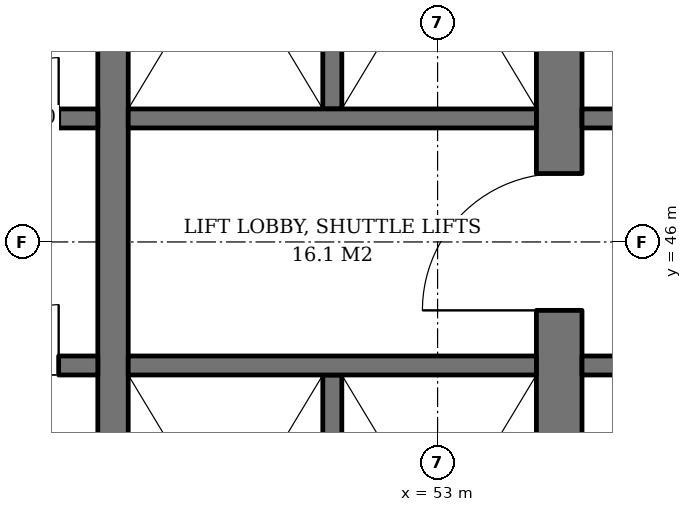
"""IFC4 building model, lengths in metres.
Left out: names, types, materials, properties, quantities, classifications, styles, units other than length and angle.
Written with IfcOpenShell. Run it as: python <this file> out.ifc"""

import sys

from ifc_helpers import new_model, si_unit, direction, frame, frame_2d, origin, place, context, subcontext, project, spatial, rectangle, extrude, element, fill, save


model = new_model("IFC4")
c1 = context("Model", 3, precision=1e-05, world=origin(), true_north=direction((0.0, 1.0)))
c2 = subcontext(c1, "Body", "Model", "MODEL_VIEW")
j1 = project(units=[si_unit("LENGTHUNIT", "METRE"), si_unit("PLANEANGLEUNIT", "RADIAN")], contexts=[c1])
p1 = place(None, origin())
s1 = spatial("IfcSite", under=j1, at=p1, CompositionType="ELEMENT")
p2 = place(p1, origin())
s2 = spatial("IfcBuilding", under=s1, at=p2, CompositionType="ELEMENT")
p3 = place(p2, frame((0.0, 0.0, 131.2)))
s3 = spatial("IfcBuildingStorey", under=s2, at=p3, CompositionType="ELEMENT", Elevation=131.2)
p4 = place(p3, frame((54.6, 36.7, 0.0), z_axis=(0.0, 0.0, 1.0), x_axis=(0.0, 1.0, 0.0)))
e1 = element("IfcWall", 1, at=p4, inside=s3, PredefinedType="SHEAR", context=c2, shape_type="SweptSolid", body=[
    extrude(rectangle(XDim=18.6, YDim=0.6, at=frame_2d((9.3, 0.0))), origin(), (0.0, 0.0, 1.0), 3.8),
])
p5 = place(p4, frame((8.4, 0.0, 0.0)))
e2 = element("IfcOpeningElement", 2, at=p5, cuts=e1, PredefinedType="OPENING", context=c2, shape_type="SweptSolid", body=[
    extrude(rectangle(XDim=1.8, YDim=2.4, at=frame_2d((0.9, 1.2))), frame((0.0, 0.31, 0.0), z_axis=(0.0, -1.0, 0.0), x_axis=(1.0, 0.0, 0.0)), (0.0, 0.0, 1.0), 0.62),
])
p6 = place(p3, frame((48.73, 40.0, 0.0), z_axis=(0.0, 0.0, 1.0), x_axis=(0.0, 1.0, 0.0)))
e3 = element("IfcWall", 3, at=p6, inside=s3, PredefinedType="SHEAR", context=c2, shape_type="SweptSolid", body=[
    extrude(rectangle(XDim=12.0, YDim=0.4, at=frame_2d((6.0, 0.0))), origin(), (0.0, 0.0, 1.0), 3.8),
])
p7 = place(p3, frame((35.7, 47.625, 0.0), z_axis=(0.0, 0.0, 1.0), x_axis=(1.0, 0.0, 0.0)))
e4 = element("IfcWall", 4, at=p7, inside=s3, PredefinedType="SHEAR", context=c2, shape_type="SweptSolid", body=[
    extrude(rectangle(XDim=12.83, YDim=0.25, at=frame_2d((6.415, 0.0))), origin(), (0.0, 0.0, 1.0), 3.8),
])
p8 = place(p7, frame((0.7, 0.0, 0.0)))
e5 = element("IfcOpeningElement", 5, at=p8, cuts=e4, PredefinedType="OPENING", context=c2, shape_type="SweptSolid", body=[
    extrude(rectangle(XDim=1.1, YDim=2.2, at=frame_2d((0.55, 1.1))), frame((0.0, 0.135, 0.0), z_axis=(0.0, -1.0, 0.0), x_axis=(1.0, 0.0, 0.0)), (0.0, 0.0, 1.0), 0.27),
])
p9 = place(p7, frame((3.45, 0.0, 0.0)))
e6 = element("IfcOpeningElement", 6, at=p9, cuts=e4, PredefinedType="OPENING", context=c2, shape_type="SweptSolid", body=[
    extrude(rectangle(XDim=1.1, YDim=2.2, at=frame_2d((0.55, 1.1))), frame((0.0, 0.135, 0.0), z_axis=(0.0, -1.0, 0.0), x_axis=(1.0, 0.0, 0.0)), (0.0, 0.0, 1.0), 0.27),
])
p10 = place(p7, frame((6.2, 0.0, 0.0)))
e7 = element("IfcOpeningElement", 7, at=p10, cuts=e4, PredefinedType="OPENING", context=c2, shape_type="SweptSolid", body=[
    extrude(rectangle(XDim=1.1, YDim=2.2, at=frame_2d((0.55, 1.1))), frame((0.0, 0.135, 0.0), z_axis=(0.0, -1.0, 0.0), x_axis=(1.0, 0.0, 0.0)), (0.0, 0.0, 1.0), 0.27),
])
p11 = place(p7, frame((8.95, 0.0, 0.0)))
e8 = element("IfcOpeningElement", 8, at=p11, cuts=e4, PredefinedType="OPENING", context=c2, shape_type="SweptSolid", body=[
    extrude(rectangle(XDim=1.1, YDim=2.2, at=frame_2d((0.55, 1.1))), frame((0.0, 0.135, 0.0), z_axis=(0.0, -1.0, 0.0), x_axis=(1.0, 0.0, 0.0)), (0.0, 0.0, 1.0), 0.27),
])
p12 = place(p7, frame((11.515, 0.0, 0.0)))
e9 = element("IfcOpeningElement", 9, at=p12, cuts=e4, PredefinedType="OPENING", context=c2, shape_type="SweptSolid", body=[
    extrude(rectangle(XDim=0.8, YDim=2.0, at=frame_2d((0.4, 1.0))), frame((0.0, 0.135, 0.0), z_axis=(0.0, -1.0, 0.0), x_axis=(1.0, 0.0, 0.0)), (0.0, 0.0, 1.0), 0.27),
])
p13 = place(p3, frame((35.7, 44.375, 0.0), z_axis=(0.0, 0.0, 1.0), x_axis=(1.0, 0.0, 0.0)))
e10 = element("IfcWall", 10, at=p13, inside=s3, PredefinedType="SHEAR", context=c2, shape_type="SweptSolid", body=[
    extrude(rectangle(XDim=12.83, YDim=0.25, at=frame_2d((6.415, 0.0))), origin(), (0.0, 0.0, 1.0), 3.8),
])
p14 = place(p13, frame((0.7, 0.0, 0.0)))
e11 = element("IfcOpeningElement", 11, at=p14, cuts=e10, PredefinedType="OPENING", context=c2, shape_type="SweptSolid", body=[
    extrude(rectangle(XDim=1.1, YDim=2.2, at=frame_2d((0.55, 1.1))), frame((0.0, 0.135, 0.0), z_axis=(0.0, -1.0, 0.0), x_axis=(1.0, 0.0, 0.0)), (0.0, 0.0, 1.0), 0.27),
])
p15 = place(p13, frame((3.45, 0.0, 0.0)))
e12 = element("IfcOpeningElement", 12, at=p15, cuts=e10, PredefinedType="OPENING", context=c2, shape_type="SweptSolid", body=[
    extrude(rectangle(XDim=1.1, YDim=2.2, at=frame_2d((0.55, 1.1))), frame((0.0, 0.135, 0.0), z_axis=(0.0, -1.0, 0.0), x_axis=(1.0, 0.0, 0.0)), (0.0, 0.0, 1.0), 0.27),
])
p16 = place(p13, frame((6.2, 0.0, 0.0)))
e13 = element("IfcOpeningElement", 13, at=p16, cuts=e10, PredefinedType="OPENING", context=c2, shape_type="SweptSolid", body=[
    extrude(rectangle(XDim=1.1, YDim=2.2, at=frame_2d((0.55, 1.1))), frame((0.0, 0.135, 0.0), z_axis=(0.0, -1.0, 0.0), x_axis=(1.0, 0.0, 0.0)), (0.0, 0.0, 1.0), 0.27),
])
p17 = place(p13, frame((8.95, 0.0, 0.0)))
e14 = element("IfcOpeningElement", 14, at=p17, cuts=e10, PredefinedType="OPENING", context=c2, shape_type="SweptSolid", body=[
    extrude(rectangle(XDim=1.1, YDim=2.2, at=frame_2d((0.55, 1.1))), frame((0.0, 0.135, 0.0), z_axis=(0.0, -1.0, 0.0), x_axis=(1.0, 0.0, 0.0)), (0.0, 0.0, 1.0), 0.27),
])
p18 = place(p13, frame((11.515, 0.0, 0.0)))
e15 = element("IfcOpeningElement", 15, at=p18, cuts=e10, PredefinedType="OPENING", context=c2, shape_type="SweptSolid", body=[
    extrude(rectangle(XDim=0.8, YDim=2.0, at=frame_2d((0.4, 1.0))), frame((0.0, 0.135, 0.0), z_axis=(0.0, -1.0, 0.0), x_axis=(1.0, 0.0, 0.0)), (0.0, 0.0, 1.0), 0.27),
])
p19 = place(p3, frame((51.615, 47.75, 0.0), z_axis=(0.0, 0.0, 1.0), x_axis=(0.0, 1.0, 0.0)))
e16 = element("IfcWall", 16, at=p19, inside=s3, PredefinedType="SHEAR", context=c2, shape_type="SweptSolid", body=[
    extrude(rectangle(XDim=4.25, YDim=0.25, at=frame_2d((2.125, 0.0))), origin(), (0.0, 0.0, 1.0), 3.8),
])
p20 = place(p3, frame((48.93, 47.625, 0.0), z_axis=(0.0, 0.0, 1.0), x_axis=(1.0, 0.0, 0.0)))
e17 = element("IfcWall", 17, at=p20, inside=s3, PredefinedType="SHEAR", context=c2, shape_type="SweptSolid", body=[
    extrude(rectangle(XDim=5.37, YDim=0.25, at=frame_2d((2.685, 0.0))), origin(), (0.0, 0.0, 1.0), 3.8),
])
p21 = place(p3, frame((51.615, 44.25, 0.0), z_axis=(0.0, 0.0, 1.0), x_axis=(0.0, -1.0, 0.0)))
e18 = element("IfcWall", 18, at=p21, inside=s3, PredefinedType="SHEAR", context=c2, shape_type="SweptSolid", body=[
    extrude(rectangle(XDim=4.25, YDim=0.25, at=frame_2d((2.125, 0.0))), origin(), (0.0, 0.0, 1.0), 3.8),
])
p22 = place(p3, frame((48.93, 44.375, 0.0), z_axis=(0.0, 0.0, 1.0), x_axis=(1.0, 0.0, 0.0)))
e19 = element("IfcWall", 19, at=p22, inside=s3, PredefinedType="SHEAR", context=c2, shape_type="SweptSolid", body=[
    extrude(rectangle(XDim=5.37, YDim=0.25, at=frame_2d((2.685, 0.0))), origin(), (0.0, 0.0, 1.0), 3.8),
])
for number, where, z_axis, x_axis in (
    (20, (54.9, 44.375, 0.0), (0.0, 0.0, 1.0), (1.0, 0.0, 0.0)),
    (21, (54.9, 47.625, 0.0), (0.0, 0.0, 1.0), (1.0, 0.0, 0.0)),
):
    element("IfcWall", number, at=place(p3, frame(where, z_axis=z_axis, x_axis=x_axis)), inside=s3, PredefinedType="SOLIDWALL", context=c2, shape_type="SweptSolid", body=[
        extrude(rectangle(XDim=2.7, YDim=0.25, at=frame_2d((1.35, 0.0))), origin(), (0.0, 0.0, 1.0), 3.62),
    ])
p23 = place(p12, origin())
e22 = element("IfcDoor", 22, at=p23, inside=s3, OperationType="SINGLE_SWING_RIGHT", PredefinedType="DOOR", context=c2, shape_type="SweptSolid", body=[
    extrude(rectangle(XDim=0.8, YDim=2.0, at=frame_2d((0.4, 1.0))), frame((0.0, 0.025, 0.0), z_axis=(0.0, -1.0, 0.0), x_axis=(1.0, 0.0, 0.0)), (0.0, 0.0, 1.0), 0.05),
])
fill(e9, e22)
p24 = place(p18, origin())
e23 = element("IfcDoor", 23, at=p24, inside=s3, OperationType="SINGLE_SWING_RIGHT", PredefinedType="DOOR", context=c2, shape_type="SweptSolid", body=[
    extrude(rectangle(XDim=0.8, YDim=2.0, at=frame_2d((0.4, 1.0))), frame((0.0, 0.025, 0.0), z_axis=(0.0, -1.0, 0.0), x_axis=(1.0, 0.0, 0.0)), (0.0, 0.0, 1.0), 0.05),
])
fill(e15, e23)
p25 = place(p5, origin())
e24 = element("IfcDoor", 24, at=p25, inside=s3, OperationType="DOUBLE_DOOR_SINGLE_SWING", PredefinedType="DOOR", context=c2, shape_type="SweptSolid", body=[
    extrude(rectangle(XDim=1.8, YDim=2.4, at=frame_2d((0.9, 1.2))), frame((0.0, 0.025, 0.0), z_axis=(0.0, -1.0, 0.0), x_axis=(1.0, 0.0, 0.0)), (0.0, 0.0, 1.0), 0.05),
])
fill(e2, e24)
save(model, sys.argv[1])
